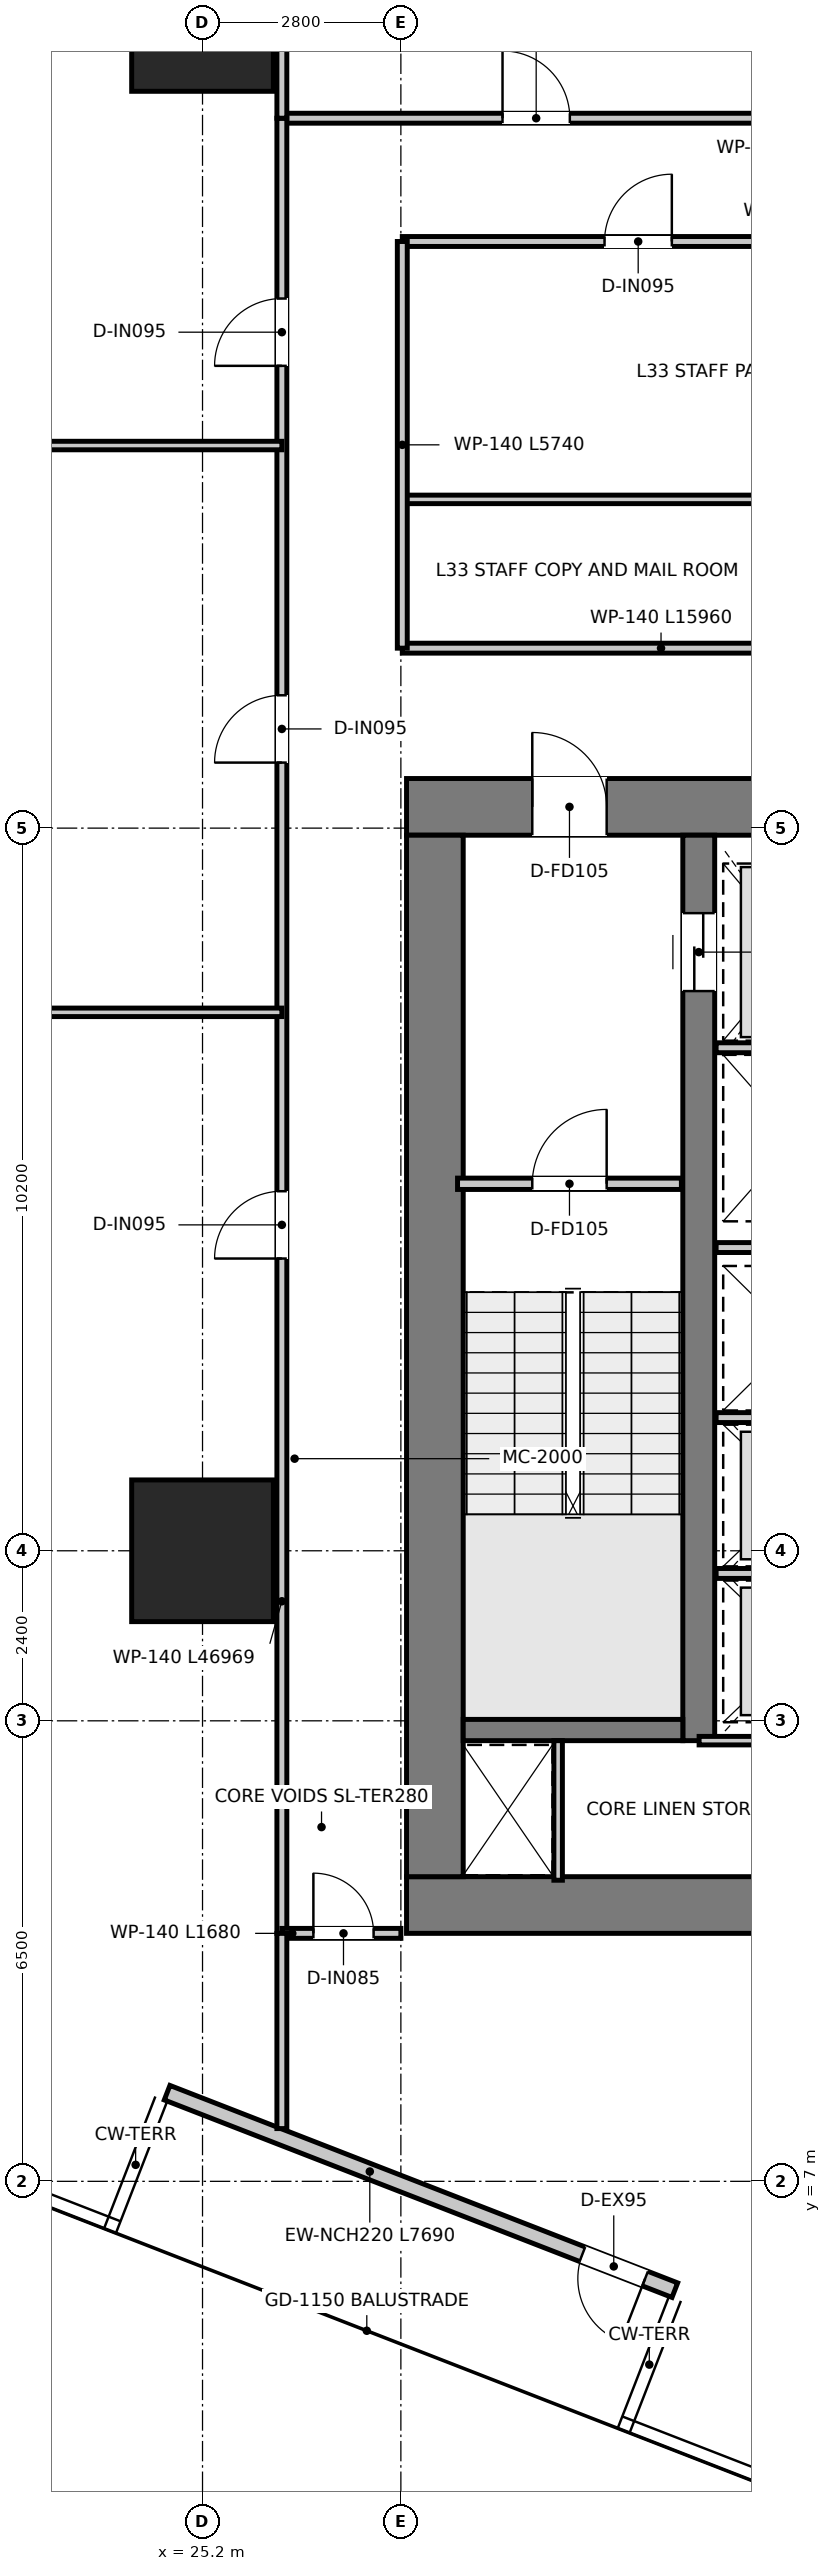
"""IFC4 building model, lengths in metres.
Left out: names, types, materials, properties, quantities, classifications, styles, units other than length and angle.
Written with IfcOpenShell. Run it as: python <this file> out.ifc"""

import sys

from ifc_helpers import new_model, si_unit, direction, frame, frame_2d, origin, origin_2d, place, context, subcontext, project, spatial, rectangle, extrude, source, transform, mapped, element, fill, save


model = new_model("IFC4")
c1 = context("Model", 3, precision=1e-05, world=origin(), true_north=direction((0.0, 1.0)))
c2 = subcontext(c1, "Body", "Model", "MODEL_VIEW")
j1 = project(units=[si_unit("LENGTHUNIT", "METRE"), si_unit("PLANEANGLEUNIT", "RADIAN")], contexts=[c1])
p1 = place(None, origin())
s1 = spatial("IfcSite", under=j1, at=p1, CompositionType="ELEMENT")
p2 = place(p1, origin())
s2 = spatial("IfcBuilding", under=s1, at=p2, CompositionType="ELEMENT")
p3 = place(p2, frame((0.0, 0.0, 137.45)))
s3 = spatial("IfcBuildingStorey", under=s2, at=p3, CompositionType="ELEMENT", Elevation=137.45)
p4 = place(p3, frame((28.08, 10.9, 0.0), z_axis=(0.0, 0.0, 1.0), x_axis=(1.0, 0.0, 0.0)))
e1 = element("IfcWall", 1, at=p4, inside=s3, PredefinedType="SHEAR", context=c2, shape_type="SweptSolid", body=[
    extrude(rectangle(XDim=15.84, YDim=0.8, at=frame_2d((7.92, 0.0))), origin(), (0.0, 0.0, 1.0), 3.95),
])
p5 = place(p3, frame((28.08, 26.4, 0.0), z_axis=(0.0, 0.0, 1.0), x_axis=(1.0, 0.0, 0.0)))
e2 = element("IfcWall", 2, at=p5, inside=s3, PredefinedType="SHEAR", context=c2, shape_type="SweptSolid", body=[
    extrude(rectangle(XDim=15.84, YDim=0.8, at=frame_2d((7.92, 0.0))), origin(), (0.0, 0.0, 1.0), 3.95),
])
p6 = place(p5, frame((7.22, 0.0, 0.0)))
e3 = element("IfcOpeningElement", 3, at=p6, cuts=e2, PredefinedType="OPENING", context=c2, shape_type="SweptSolid", body=[
    extrude(rectangle(XDim=1.4, YDim=2.2, at=frame_2d((0.7, 1.1))), frame((0.0, 0.41, 0.0), z_axis=(0.0, -1.0, 0.0), x_axis=(1.0, 0.0, 0.0)), (0.0, 0.0, 1.0), 0.82),
])
p7 = place(p5, frame((1.775, 0.0, 0.0)))
e4 = element("IfcOpeningElement", 4, at=p7, cuts=e2, PredefinedType="OPENING", context=c2, shape_type="SweptSolid", body=[
    extrude(rectangle(XDim=1.05, YDim=2.1, at=frame_2d((0.525, 1.05))), frame((0.0, 0.41, 0.0), z_axis=(0.0, -1.0, 0.0), x_axis=(1.0, 0.0, 0.0)), (0.0, 0.0, 1.0), 0.82),
])
p8 = place(p5, frame((13.015, 0.0, 0.0)))
e5 = element("IfcOpeningElement", 5, at=p8, cuts=e2, PredefinedType="OPENING", context=c2, shape_type="SweptSolid", body=[
    extrude(rectangle(XDim=1.05, YDim=2.1, at=frame_2d((0.525, 1.05))), frame((0.0, 0.41, 0.0), z_axis=(0.0, -1.0, 0.0), x_axis=(1.0, 0.0, 0.0)), (0.0, 0.0, 1.0), 0.82),
])
p9 = place(p3, frame((28.48, 11.3, 0.0), z_axis=(0.0, 0.0, 1.0), x_axis=(0.0, 1.0, 0.0)))
e6 = element("IfcWall", 6, at=p9, inside=s3, PredefinedType="SHEAR", context=c2, shape_type="SweptSolid", body=[
    extrude(rectangle(XDim=14.7, YDim=0.8, at=frame_2d((7.35, 0.0))), origin(), (0.0, 0.0, 1.0), 3.95),
])
p10 = place(p3, frame((32.205, 13.22, 0.0), z_axis=(0.0, 0.0, 1.0), x_axis=(0.0, 1.0, 0.0)))
e7 = element("IfcWall", 7, at=p10, inside=s3, PredefinedType="SHEAR", context=c2, shape_type="SweptSolid", body=[
    extrude(rectangle(XDim=12.78, YDim=0.45, at=frame_2d((6.39, 0.0))), origin(), (0.0, 0.0, 1.0), 3.95),
])
p11 = place(p10, frame((10.58, 0.0, 0.0)))
e8 = element("IfcOpeningElement", 8, at=p11, cuts=e7, PredefinedType="OPENING", context=c2, shape_type="SweptSolid", body=[
    extrude(rectangle(XDim=1.1, YDim=2.15, at=frame_2d((0.55, 1.075))), frame((0.0, 0.235, 0.0), z_axis=(0.0, -1.0, 0.0), x_axis=(1.0, 0.0, 0.0)), (0.0, 0.0, 1.0), 0.47),
])
p12 = place(p3, frame((28.88, 13.37, 0.0), z_axis=(0.0, 0.0, 1.0), x_axis=(1.0, 0.0, 0.0)))
e9 = element("IfcWall", 9, at=p12, inside=s3, PredefinedType="SHEAR", context=c2, shape_type="SweptSolid", body=[
    extrude(rectangle(XDim=3.1, YDim=0.3, at=frame_2d((1.55, 0.0))), origin(), (0.0, 0.0, 1.0), 3.95),
])
m1 = source(origin(), c2, "Body", "SweptSolid", [
    extrude(rectangle(XDim=2.0, YDim=2.0, at=origin_2d()), origin(), (0.0, 0.0, 1.0), 3.95),
])
for number, where, z_axis, x_axis in (
    (10, (25.2, 15.9, 0.0), (0.0, 0.0, 1.0), (1.0, 0.0, 0.0)),
    (11, (25.2, 37.5, 0.0), (0.0, 0.0, 1.0), (1.0, 0.0, 0.0)),
):
    element("IfcColumn", number, at=place(p3, frame(where, z_axis=z_axis, x_axis=x_axis)), inside=s3, PredefinedType="USERDEFINED", context=c2, shape_type="MappedRepresentation", body=[
        mapped(m1, transform((0.0, 0.0, 0.0), x_axis=(1.0, 0.0, 0.0), y_axis=(0.0, 1.0, 0.0), z_axis=(0.0, 0.0, 1.0), scale=1.0)),
    ])
p13 = place(p3, frame((31.867, 5.464, 0.0), z_axis=(0.0, 0.0, 1.0), x_axis=(-0.931996329979, 0.362467710157, 0.0)))
e12 = element("IfcWall", 12, at=p13, inside=s3, PredefinedType="ELEMENTEDWALL", context=c2, shape_type="SweptSolid", body=[
    extrude(rectangle(XDim=7.69, YDim=0.22, at=frame_2d((3.845, 0.0))), origin(), (0.0, 0.0, 1.0), 3.6),
])
p14 = place(p13, frame((0.45, 0.0, 0.0)))
e13 = element("IfcOpeningElement", 13, at=p14, cuts=e12, PredefinedType="OPENING", context=c2, shape_type="SweptSolid", body=[
    extrude(rectangle(XDim=0.95, YDim=2.1, at=frame_2d((0.475, 1.05))), frame((0.0, 0.12, 0.0), z_axis=(0.0, -1.0, 0.0), x_axis=(1.0, 0.0, 0.0)), (0.0, 0.0, 1.0), 0.24),
])
p15 = place(p3, frame((28.8, 21.08, 0.0), z_axis=(0.0, 0.0, 1.0), x_axis=(1.0, 0.0, 0.0)))
e14 = element("IfcWall", 14, at=p15, inside=s3, PredefinedType="PARTITIONING", context=c2, shape_type="SweptSolid", body=[
    extrude(rectangle(XDim=3.16, YDim=0.16, at=frame_2d((1.58, 0.0))), origin(), (0.0, 0.0, 1.0), 3.6),
])
p16 = place(p15, frame((1.055, 0.0, 0.0)))
e15 = element("IfcOpeningElement", 15, at=p16, cuts=e14, PredefinedType="OPENING", context=c2, shape_type="SweptSolid", body=[
    extrude(rectangle(XDim=1.05, YDim=2.1, at=frame_2d((0.525, 1.05))), frame((0.0, 0.09, 0.0), z_axis=(0.0, -1.0, 0.0), x_axis=(1.0, 0.0, 0.0)), (0.0, 0.0, 1.0), 0.18),
])
p17 = place(p3, frame((32.45, 23.0, 0.0), z_axis=(0.0, 0.0, 1.0), x_axis=(1.0, 0.0, 0.0)))
e16 = element("IfcWall", 16, at=p17, inside=s3, PredefinedType="PARTITIONING", context=c2, shape_type="SweptSolid", body=[
    extrude(rectangle(XDim=2.27, YDim=0.14, at=frame_2d((1.135, 0.0))), origin(), (0.0, 0.0, 1.0), 2.6),
])
for number, where, z_axis, x_axis in (
    (17, (32.45, 17.78, 0.0), (0.0, 0.0, 1.0), (1.0, 0.0, 0.0)),
    (18, (32.45, 20.18, 0.0), (0.0, 0.0, 1.0), (1.0, 0.0, 0.0)),
    (19, (32.45, 15.58, 0.0), (0.0, 0.0, 1.0), (1.0, 0.0, 0.0)),
):
    element("IfcWall", number, at=place(p3, frame(where, z_axis=z_axis, x_axis=x_axis)), inside=s3, PredefinedType="PARTITIONING", context=c2, shape_type="SweptSolid", body=[
        extrude(rectangle(XDim=2.27, YDim=0.14, at=frame_2d((1.135, 0.0))), origin(), (0.0, 0.0, 1.0), 3.6),
    ])
p18 = place(p3, frame((30.22, 11.25, 0.0), z_axis=(0.0, 0.0, 1.0), x_axis=(0.0, 1.0, 0.0)))
e20 = element("IfcWall", 20, at=p18, inside=s3, PredefinedType="PARTITIONING", context=c2, shape_type="SweptSolid", body=[
    extrude(rectangle(XDim=1.97, YDim=0.12, at=frame_2d((0.985, 0.0))), origin(), (0.0, 0.0, 1.0), 3.6),
])
p19 = place(p3, frame((32.21, 13.22, 0.0), z_axis=(0.0, 0.0, 1.0), x_axis=(1.0, 0.0, 0.0)))
e21 = element("IfcWall", 21, at=p19, inside=s3, PredefinedType="PARTITIONING", context=c2, shape_type="SweptSolid", body=[
    extrude(rectangle(XDim=7.58, YDim=0.12, at=frame_2d((3.79, 0.0))), origin(), (0.0, 0.0, 1.0), 3.6),
])
p20 = place(p19, frame((3.365, 0.0, 0.0)))
e22 = element("IfcOpeningElement", 22, at=p20, cuts=e21, PredefinedType="OPENING", context=c2, shape_type="SweptSolid", body=[
    extrude(rectangle(XDim=0.85, YDim=2.1, at=frame_2d((0.425, 1.05))), frame((0.0, 0.07, 0.0), z_axis=(0.0, -1.0, 0.0), x_axis=(1.0, 0.0, 0.0)), (0.0, 0.0, 1.0), 0.14),
])
p21 = place(p3, frame((28.02, 28.64, 0.0), z_axis=(0.0, 0.0, 1.0), x_axis=(1.0, 0.0, 0.0)))
e23 = element("IfcWall", 23, at=p21, inside=s3, PredefinedType="PARTITIONING", context=c2, shape_type="SweptSolid", body=[
    extrude(rectangle(XDim=15.96, YDim=0.14, at=frame_2d((7.98, 0.0))), origin(), (0.0, 0.0, 1.0), 3.01),
])
p22 = place(p21, frame((7.455, 0.0, 0.0)))
e24 = element("IfcOpeningElement", 24, at=p22, cuts=e23, PredefinedType="OPENING", context=c2, shape_type="SweptSolid", body=[
    extrude(rectangle(XDim=1.05, YDim=2.15, at=frame_2d((0.525, 1.075))), frame((0.0, 0.08, 0.0), z_axis=(0.0, -1.0, 0.0), x_axis=(1.0, 0.0, 0.0)), (0.0, 0.0, 1.0), 0.16),
])
p23 = place(p3, frame((28.02, 30.74, 0.0), z_axis=(0.0, 0.0, 1.0), x_axis=(1.0, 0.0, 0.0)))
e25 = element("IfcWall", 25, at=p23, inside=s3, PredefinedType="PARTITIONING", context=c2, shape_type="SweptSolid", body=[
    extrude(rectangle(XDim=15.96, YDim=0.12, at=frame_2d((7.98, 0.0))), origin(), (0.0, 0.0, 1.0), 3.01),
])
p24 = place(p3, frame((28.02, 34.38, 0.0), z_axis=(0.0, 0.0, 1.0), x_axis=(1.0, 0.0, 0.0)))
e26 = element("IfcWall", 26, at=p24, inside=s3, PredefinedType="PARTITIONING", context=c2, shape_type="SweptSolid", body=[
    extrude(rectangle(XDim=15.96, YDim=0.14, at=frame_2d((7.98, 0.0))), origin(), (0.0, 0.0, 1.0), 3.01),
])
p25 = place(p24, frame((7.83, 0.0, 0.0)))
e27 = element("IfcOpeningElement", 27, at=p25, cuts=e26, PredefinedType="OPENING", context=c2, shape_type="SweptSolid", body=[
    extrude(rectangle(XDim=0.9, YDim=2.1, at=frame_2d((0.45, 1.05))), frame((0.0, 0.08, 0.0), z_axis=(0.0, -1.0, 0.0), x_axis=(1.0, 0.0, 0.0)), (0.0, 0.0, 1.0), 0.16),
])
p26 = place(p24, frame((11.03, 0.0, 0.0)))
e28 = element("IfcOpeningElement", 28, at=p26, cuts=e26, PredefinedType="OPENING", context=c2, shape_type="SweptSolid", body=[
    extrude(rectangle(XDim=0.9, YDim=2.1, at=frame_2d((0.45, 1.05))), frame((0.0, 0.08, 0.0), z_axis=(0.0, -1.0, 0.0), x_axis=(1.0, 0.0, 0.0)), (0.0, 0.0, 1.0), 0.16),
])
p27 = place(p24, frame((14.055, 0.0, 0.0)))
e29 = element("IfcOpeningElement", 29, at=p27, cuts=e26, PredefinedType="OPENING", context=c2, shape_type="SweptSolid", body=[
    extrude(rectangle(XDim=0.95, YDim=2.1, at=frame_2d((0.475, 1.05))), frame((0.0, 0.08, 0.0), z_axis=(0.0, -1.0, 0.0), x_axis=(1.0, 0.0, 0.0)), (0.0, 0.0, 1.0), 0.16),
])
p28 = place(p24, frame((2.855, 0.0, 0.0)))
e30 = element("IfcOpeningElement", 30, at=p28, cuts=e26, PredefinedType="OPENING", context=c2, shape_type="SweptSolid", body=[
    extrude(rectangle(XDim=0.95, YDim=2.1, at=frame_2d((0.475, 1.05))), frame((0.0, 0.08, 0.0), z_axis=(0.0, -1.0, 0.0), x_axis=(1.0, 0.0, 0.0)), (0.0, 0.0, 1.0), 0.16),
])
p29 = place(p3, frame((28.02, 28.64, 0.0), z_axis=(0.0, 0.0, 1.0), x_axis=(0.0, 1.0, 0.0)))
e31 = element("IfcWall", 31, at=p29, inside=s3, PredefinedType="PARTITIONING", context=c2, shape_type="SweptSolid", body=[
    extrude(rectangle(XDim=5.74, YDim=0.14, at=frame_2d((2.87, 0.0))), origin(), (0.0, 0.0, 1.0), 3.2),
])
p30 = place(p3, frame((26.32, 36.12, 0.0), z_axis=(0.0, 0.0, 1.0), x_axis=(1.0, 0.0, 0.0)))
e32 = element("IfcWall", 32, at=p30, inside=s3, PredefinedType="PARTITIONING", context=c2, shape_type="SweptSolid", body=[
    extrude(rectangle(XDim=19.36, YDim=0.14, at=frame_2d((9.68, 0.0))), origin(), (0.0, 0.0, 1.0), 3.01),
])
p31 = place(p30, frame((3.115, 0.0, 0.0)))
e33 = element("IfcOpeningElement", 33, at=p31, cuts=e32, PredefinedType="OPENING", context=c2, shape_type="SweptSolid", body=[
    extrude(rectangle(XDim=0.95, YDim=2.1, at=frame_2d((0.475, 1.05))), frame((0.0, 0.08, 0.0), z_axis=(0.0, -1.0, 0.0), x_axis=(1.0, 0.0, 0.0)), (0.0, 0.0, 1.0), 0.16),
])
p32 = place(p30, frame((10.205, 0.0, 0.0)))
e34 = element("IfcOpeningElement", 34, at=p32, cuts=e32, PredefinedType="OPENING", context=c2, shape_type="SweptSolid", body=[
    extrude(rectangle(XDim=0.95, YDim=2.1, at=frame_2d((0.475, 1.05))), frame((0.0, 0.08, 0.0), z_axis=(0.0, -1.0, 0.0), x_axis=(1.0, 0.0, 0.0)), (0.0, 0.0, 1.0), 0.16),
])
p33 = place(p30, frame((16.295, 0.0, 0.0)))
e35 = element("IfcOpeningElement", 35, at=p33, cuts=e32, PredefinedType="OPENING", context=c2, shape_type="SweptSolid", body=[
    extrude(rectangle(XDim=0.95, YDim=2.1, at=frame_2d((0.475, 1.05))), frame((0.0, 0.08, 0.0), z_axis=(0.0, -1.0, 0.0), x_axis=(1.0, 0.0, 0.0)), (0.0, 0.0, 1.0), 0.16),
])
p34 = place(p3, frame((26.32, 10.5, 0.0), z_axis=(0.0, 0.0, 1.0), x_axis=(0.0, 1.0, 0.0)))
e36 = element("IfcWall", 36, at=p34, inside=s3, PredefinedType="PARTITIONING", context=c2, shape_type="SweptSolid", body=[
    extrude(rectangle(XDim=25.62, YDim=0.14, at=frame_2d((12.81, 0.0))), origin(), (0.0, 0.0, 1.0), 2.9),
])
p35 = place(p34, frame((9.525, 0.0, 0.0)))
e37 = element("IfcOpeningElement", 37, at=p35, cuts=e36, PredefinedType="OPENING", context=c2, shape_type="SweptSolid", body=[
    extrude(rectangle(XDim=0.95, YDim=2.1, at=frame_2d((0.475, 1.05))), frame((0.0, 0.08, 0.0), z_axis=(0.0, -1.0, 0.0), x_axis=(1.0, 0.0, 0.0)), (0.0, 0.0, 1.0), 0.16),
])
p36 = place(p34, frame((16.525, 0.0, 0.0)))
e38 = element("IfcOpeningElement", 38, at=p36, cuts=e36, PredefinedType="OPENING", context=c2, shape_type="SweptSolid", body=[
    extrude(rectangle(XDim=0.95, YDim=2.1, at=frame_2d((0.475, 1.05))), frame((0.0, 0.08, 0.0), z_axis=(0.0, -1.0, 0.0), x_axis=(1.0, 0.0, 0.0)), (0.0, 0.0, 1.0), 0.16),
])
p37 = place(p34, frame((22.125, 0.0, 0.0)))
e39 = element("IfcOpeningElement", 39, at=p37, cuts=e36, PredefinedType="OPENING", context=c2, shape_type="SweptSolid", body=[
    extrude(rectangle(XDim=0.95, YDim=2.1, at=frame_2d((0.475, 1.05))), frame((0.0, 0.08, 0.0), z_axis=(0.0, -1.0, 0.0), x_axis=(1.0, 0.0, 0.0)), (0.0, 0.0, 1.0), 0.16),
])
p38 = place(p3, frame((26.32, 10.5, 0.0), z_axis=(0.0, 0.0, 1.0), x_axis=(1.0, 0.0, 0.0)))
e40 = element("IfcWall", 40, at=p38, inside=s3, PredefinedType="PARTITIONING", context=c2, shape_type="SweptSolid", body=[
    extrude(rectangle(XDim=1.68, YDim=0.14, at=frame_2d((0.84, 0.0))), origin(), (0.0, 0.0, 1.0), 3.6),
])
p39 = place(p38, frame((0.445, 0.0, 0.0)))
e41 = element("IfcOpeningElement", 41, at=p39, cuts=e40, PredefinedType="OPENING", context=c2, shape_type="SweptSolid", body=[
    extrude(rectangle(XDim=0.85, YDim=2.1, at=frame_2d((0.425, 1.05))), frame((0.0, 0.08, 0.0), z_axis=(0.0, -1.0, 0.0), x_axis=(1.0, 0.0, 0.0)), (0.0, 0.0, 1.0), 0.16),
])
p40 = place(p3, frame((26.32, 36.12, 0.0), z_axis=(0.0, 0.0, 1.0), x_axis=(0.0, 1.0, 0.0)))
e42 = element("IfcWall", 42, at=p40, inside=s3, PredefinedType="PARTITIONING", context=c2, shape_type="SweptSolid", body=[
    extrude(rectangle(XDim=18.594, YDim=0.14, at=frame_2d((9.297, 0.0))), origin(), (0.0, 0.0, 1.0), 2.9),
])
p41 = place(p3, frame((26.32, 7.745, 0.0), z_axis=(0.0, 0.0, 1.0), x_axis=(0.0, 1.0, 0.0)))
e43 = element("IfcWall", 43, at=p41, inside=s3, PredefinedType="PARTITIONING", context=c2, shape_type="SweptSolid", body=[
    extrude(rectangle(XDim=2.755, YDim=0.14, at=frame_2d((1.378, 0.0))), origin(), (0.0, 0.0, 1.0), 3.6),
])
p42 = place(p3, frame((9.745, 23.5, 0.0), z_axis=(0.0, 0.0, 1.0), x_axis=(1.0, 0.0, 0.0)))
e44 = element("IfcWall", 44, at=p42, inside=s3, PredefinedType="PARTITIONING", context=c2, shape_type="SweptSolid", body=[
    extrude(rectangle(XDim=16.575, YDim=0.12, at=frame_2d((8.288, 0.0))), origin(), (0.0, 0.0, 1.0), 2.9),
])
p43 = place(p3, frame((12.856, 31.5, 0.0), z_axis=(0.0, 0.0, 1.0), x_axis=(1.0, 0.0, 0.0)))
e45 = element("IfcWall", 45, at=p43, inside=s3, PredefinedType="PARTITIONING", context=c2, shape_type="SweptSolid", body=[
    extrude(rectangle(XDim=13.464, YDim=0.12, at=frame_2d((6.732, 0.0))), origin(), (0.0, 0.0, 1.0), 2.9),
])
p44 = place(p16, origin())
e46 = element("IfcDoor", 46, at=p44, inside=s3, OperationType="SINGLE_SWING_RIGHT", PredefinedType="DOOR", context=c2, shape_type="SweptSolid", body=[
    extrude(rectangle(XDim=1.05, YDim=2.1, at=frame_2d((0.525, 1.05))), frame((0.0, 0.025, 0.0), z_axis=(0.0, -1.0, 0.0), x_axis=(1.0, 0.0, 0.0)), (0.0, 0.0, 1.0), 0.05),
])
fill(e15, e46)
p45 = place(p7, origin())
e47 = element("IfcDoor", 47, at=p45, inside=s3, OperationType="SINGLE_SWING_LEFT", PredefinedType="DOOR", context=c2, shape_type="SweptSolid", body=[
    extrude(rectangle(XDim=1.05, YDim=2.1, at=frame_2d((0.525, 1.05))), frame((0.0, 0.025, 0.0), z_axis=(0.0, -1.0, 0.0), x_axis=(1.0, 0.0, 0.0)), (0.0, 0.0, 1.0), 0.05),
])
fill(e4, e47)
p46 = place(p11, origin())
e48 = element("IfcDoor", 48, at=p46, inside=s3, OperationType="DOUBLE_DOOR_SLIDING", PredefinedType="DOOR", context=c2, shape_type="SweptSolid", body=[
    extrude(rectangle(XDim=1.1, YDim=2.15, at=frame_2d((0.55, 1.075))), frame((0.0, 0.025, 0.0), z_axis=(0.0, -1.0, 0.0), x_axis=(1.0, 0.0, 0.0)), (0.0, 0.0, 1.0), 0.05),
])
fill(e8, e48)
p47 = place(p28, origin())
e49 = element("IfcDoor", 49, at=p47, inside=s3, OperationType="SINGLE_SWING_RIGHT", PredefinedType="DOOR", context=c2, shape_type="SweptSolid", body=[
    extrude(rectangle(XDim=0.95, YDim=2.1, at=frame_2d((0.475, 1.05))), frame((0.0, 0.025, 0.0), z_axis=(0.0, -1.0, 0.0), x_axis=(1.0, 0.0, 0.0)), (0.0, 0.0, 1.0), 0.05),
])
fill(e30, e49)
p48 = place(p31, origin())
e50 = element("IfcDoor", 50, at=p48, inside=s3, OperationType="SINGLE_SWING_LEFT", PredefinedType="DOOR", context=c2, shape_type="SweptSolid", body=[
    extrude(rectangle(XDim=0.95, YDim=2.1, at=frame_2d((0.475, 1.05))), frame((0.0, 0.025, 0.0), z_axis=(0.0, -1.0, 0.0), x_axis=(1.0, 0.0, 0.0)), (0.0, 0.0, 1.0), 0.05),
])
fill(e33, e50)
p49 = place(p35, origin())
e51 = element("IfcDoor", 51, at=p49, inside=s3, OperationType="SINGLE_SWING_LEFT", PredefinedType="DOOR", context=c2, shape_type="SweptSolid", body=[
    extrude(rectangle(XDim=0.95, YDim=2.1, at=frame_2d((0.475, 1.05))), frame((0.0, 0.025, 0.0), z_axis=(0.0, -1.0, 0.0), x_axis=(1.0, 0.0, 0.0)), (0.0, 0.0, 1.0), 0.05),
])
fill(e37, e51)
p50 = place(p36, origin())
e52 = element("IfcDoor", 52, at=p50, inside=s3, OperationType="SINGLE_SWING_LEFT", PredefinedType="DOOR", context=c2, shape_type="SweptSolid", body=[
    extrude(rectangle(XDim=0.95, YDim=2.1, at=frame_2d((0.475, 1.05))), frame((0.0, 0.025, 0.0), z_axis=(0.0, -1.0, 0.0), x_axis=(1.0, 0.0, 0.0)), (0.0, 0.0, 1.0), 0.05),
])
fill(e38, e52)
p51 = place(p37, origin())
e53 = element("IfcDoor", 53, at=p51, inside=s3, OperationType="SINGLE_SWING_LEFT", PredefinedType="DOOR", context=c2, shape_type="SweptSolid", body=[
    extrude(rectangle(XDim=0.95, YDim=2.1, at=frame_2d((0.475, 1.05))), frame((0.0, 0.025, 0.0), z_axis=(0.0, -1.0, 0.0), x_axis=(1.0, 0.0, 0.0)), (0.0, 0.0, 1.0), 0.05),
])
fill(e39, e53)
p52 = place(p39, origin())
e54 = element("IfcDoor", 54, at=p52, inside=s3, OperationType="SINGLE_SWING_LEFT", PredefinedType="DOOR", context=c2, shape_type="SweptSolid", body=[
    extrude(rectangle(XDim=0.85, YDim=2.1, at=frame_2d((0.425, 1.05))), frame((0.0, 0.025, 0.0), z_axis=(0.0, -1.0, 0.0), x_axis=(1.0, 0.0, 0.0)), (0.0, 0.0, 1.0), 0.05),
])
fill(e41, e54)
p53 = place(p14, origin())
e55 = element("IfcDoor", 55, at=p53, inside=s3, OperationType="SINGLE_SWING_LEFT", PredefinedType="DOOR", context=c2, shape_type="SweptSolid", body=[
    extrude(rectangle(XDim=0.95, YDim=2.1, at=frame_2d((0.475, 1.05))), frame((0.0, 0.025, 0.0), z_axis=(0.0, -1.0, 0.0), x_axis=(1.0, 0.0, 0.0)), (0.0, 0.0, 1.0), 0.05),
])
fill(e13, e55)
save(model, sys.argv[1])
